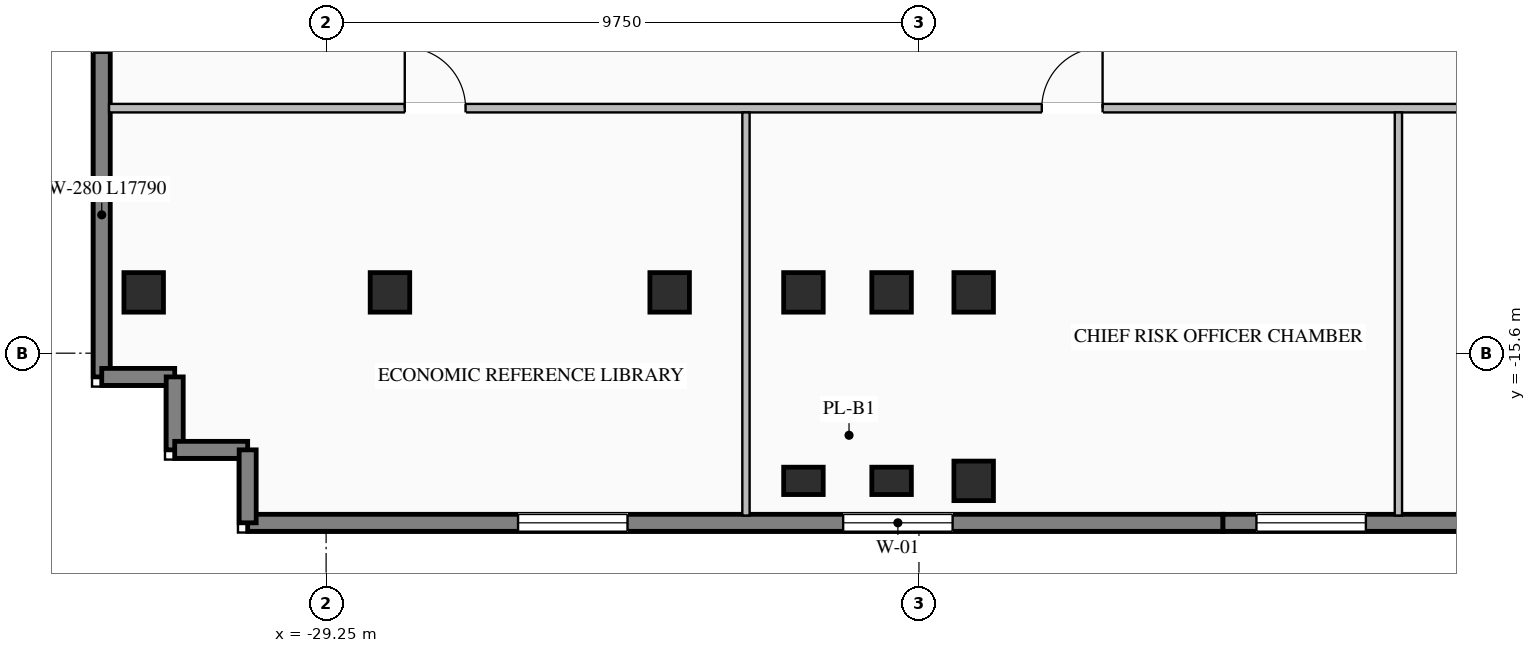
"""IFC4 building model, lengths in metres.
Left out: names, types, materials, properties, quantities, classifications, styles, units other than length and angle.
Written with IfcOpenShell. Run it as: python <this file> out.ifc"""

import sys

from ifc_helpers import new_model, si_unit, direction, frame, frame_2d, origin, origin_2d, place, context, subcontext, project, spatial, rectangle, i_section, extrude, element, fill, save


model = new_model("IFC4")
c1 = context("Model", 3, precision=1e-05, world=origin(), true_north=direction((0.0, 1.0)))
c2 = subcontext(c1, "Body", "Model", "MODEL_VIEW")
j1 = project(units=[si_unit("LENGTHUNIT", "METRE"), si_unit("PLANEANGLEUNIT", "RADIAN")], contexts=[c1])
p1 = place(None, origin())
s1 = spatial("IfcSite", under=j1, at=p1, CompositionType="ELEMENT")
p2 = place(p1, origin())
s2 = spatial("IfcBuilding", under=s1, at=p2, CompositionType="ELEMENT")
p3 = place(p2, frame((0.0, 0.0, 148.45)))
s3 = spatial("IfcBuildingStorey", under=s2, at=p3, CompositionType="ELEMENT", Elevation=148.45)
for number, where, z_axis, x_axis in (
    (1, (-21.4, -14.6, 0.0), (0.0, 0.0, 1.0), (1.0, 0.0, 0.0)),
    (2, (-19.95, -14.6, 0.0), (0.0, 0.0, 1.0), (1.0, 0.0, 0.0)),
    (3, (-18.6, -14.6, 0.0), (0.0, 0.0, 1.0), (1.0, 0.0, 0.0)),
    (4, (-23.6, -14.6, 0.0), (0.0, 0.0, 1.0), (1.0, 0.0, 0.0)),
    (5, (-28.2, -14.6, 0.0), (0.0, 0.0, 1.0), (1.0, 0.0, 0.0)),
    (6, (-18.6, -17.7, 0.0), (0.0, 0.0, 1.0), (1.0, 0.0, 0.0)),
    (7, (-32.25, -14.6, 0.0), (0.0, 0.0, 1.0), (1.0, 0.0, 0.0)),
):
    element("IfcColumn", number, at=place(p3, frame(where, z_axis=z_axis, x_axis=x_axis)), inside=s3, PredefinedType="COLUMN", context=c2, shape_type="SweptSolid", body=[
        extrude(i_section(OverallWidth=0.65, OverallDepth=0.65, WebThickness=0.028, FlangeThickness=0.04, at=origin_2d()), origin(), (0.0, 0.0, 1.0), 3.45),
    ])
for number, where, z_axis, x_axis in (
    (8, (-21.4, -17.7, 0.0), (0.0, 0.0, 1.0), (1.0, 0.0, 0.0)),
    (9, (-19.95, -17.7, 0.0), (0.0, 0.0, 1.0), (1.0, 0.0, 0.0)),
):
    element("IfcColumn", number, at=place(p3, frame(where, z_axis=z_axis, x_axis=x_axis)), inside=s3, PredefinedType="PILASTER", context=c2, shape_type="SweptSolid", body=[
        extrude(rectangle(XDim=0.65, YDim=0.45, at=origin_2d()), origin(), (0.0, 0.0, 1.0), 3.45),
    ])
p4 = place(p3, frame((-14.5, -18.39, 0.0), z_axis=(0.0, 0.0, 1.0), x_axis=(-1.0, 0.0, 0.0)))
e10 = element("IfcWall", 10, at=p4, inside=s3, PredefinedType="STANDARD", context=c2, shape_type="SweptSolid", body=[
    extrude(rectangle(XDim=16.04, YDim=0.28, at=frame_2d((8.02, 0.0))), origin(), (0.0, 0.0, 1.0), 3.25),
])
p5 = place(p4, frame((4.447, 0.0, 0.76)))
e11 = element("IfcOpeningElement", 11, at=p5, cuts=e10, PredefinedType="OPENING", context=c2, shape_type="SweptSolid", body=[
    extrude(rectangle(XDim=1.8, YDim=1.95, at=frame_2d((0.9, 0.975))), frame((0.0, 0.15, 0.0), z_axis=(0.0, -1.0, 0.0), x_axis=(1.0, 0.0, 0.0)), (0.0, 0.0, 1.0), 0.3),
])
p6 = place(p4, frame((9.793, 0.0, 0.76)))
e12 = element("IfcOpeningElement", 12, at=p6, cuts=e10, PredefinedType="OPENING", context=c2, shape_type="SweptSolid", body=[
    extrude(rectangle(XDim=1.8, YDim=1.95, at=frame_2d((0.9, 0.975))), frame((0.0, 0.15, 0.0), z_axis=(0.0, -1.0, 0.0), x_axis=(1.0, 0.0, 0.0)), (0.0, 0.0, 1.0), 0.3),
])
p7 = place(p3, frame((-5.5, -18.39, 0.0), z_axis=(0.0, 0.0, 1.0), x_axis=(-1.0, 0.0, 0.0)))
e13 = element("IfcWall", 13, at=p7, inside=s3, PredefinedType="STANDARD", context=c2, shape_type="SweptSolid", body=[
    extrude(rectangle(XDim=9.0, YDim=0.28, at=frame_2d((4.5, 0.0))), origin(), (0.0, 0.0, 1.0), 3.25),
])
p8 = place(p7, frame((2.1, 0.0, 0.76)))
e14 = element("IfcOpeningElement", 14, at=p8, cuts=e13, PredefinedType="OPENING", context=c2, shape_type="SweptSolid", body=[
    extrude(rectangle(XDim=1.8, YDim=1.95, at=frame_2d((0.9, 0.975))), frame((0.0, 0.15, 0.0), z_axis=(0.0, -1.0, 0.0), x_axis=(1.0, 0.0, 0.0)), (0.0, 0.0, 1.0), 0.3),
])
p9 = place(p7, frame((6.65, 0.0, 0.76)))
e15 = element("IfcOpeningElement", 15, at=p9, cuts=e13, PredefinedType="OPENING", context=c2, shape_type="SweptSolid", body=[
    extrude(rectangle(XDim=1.8, YDim=1.95, at=frame_2d((0.9, 0.975))), frame((0.0, 0.15, 0.0), z_axis=(0.0, -1.0, 0.0), x_axis=(1.0, 0.0, 0.0)), (0.0, 0.0, 1.0), 0.3),
])
p10 = place(p3, frame((-32.94, -15.99, 0.0), z_axis=(0.0, 0.0, 1.0), x_axis=(0.0, 1.0, 0.0)))
e16 = element("IfcWall", 16, at=p10, inside=s3, PredefinedType="STANDARD", context=c2, shape_type="SweptSolid", body=[
    extrude(rectangle(XDim=17.79, YDim=0.28, at=frame_2d((8.895, 0.0))), origin(), (0.0, 0.0, 1.0), 3.25),
])
p11 = place(p10, frame((5.33, 0.0, 0.76)))
e17 = element("IfcOpeningElement", 17, at=p11, cuts=e16, PredefinedType="OPENING", context=c2, shape_type="SweptSolid", body=[
    extrude(rectangle(XDim=1.2, YDim=1.95, at=frame_2d((0.6, 0.975))), frame((0.0, 0.15, 0.0), z_axis=(0.0, -1.0, 0.0), x_axis=(1.0, 0.0, 0.0)), (0.0, 0.0, 1.0), 0.3),
])
p12 = place(p10, frame((11.26, 0.0, 0.76)))
e18 = element("IfcOpeningElement", 18, at=p12, cuts=e16, PredefinedType="OPENING", context=c2, shape_type="SweptSolid", body=[
    extrude(rectangle(XDim=1.2, YDim=1.95, at=frame_2d((0.6, 0.975))), frame((0.0, 0.15, 0.0), z_axis=(0.0, -1.0, 0.0), x_axis=(1.0, 0.0, 0.0)), (0.0, 0.0, 1.0), 0.3),
])
for number, where, z_axis, x_axis in (
    (19, (-32.94, -15.99, 0.0), (0.0, 0.0, 1.0), (1.0, 0.0, 0.0)),
    (20, (-31.74, -15.99, 0.0), (0.0, 0.0, 1.0), (0.0, -1.0, 0.0)),
    (21, (-31.74, -17.19, 0.0), (0.0, 0.0, 1.0), (1.0, 0.0, 0.0)),
    (22, (-30.54, -17.19, 0.0), (0.0, 0.0, 1.0), (0.0, -1.0, 0.0)),
):
    element("IfcWall", number, at=place(p3, frame(where, z_axis=z_axis, x_axis=x_axis)), inside=s3, PredefinedType="STANDARD", context=c2, shape_type="SweptSolid", body=[
        extrude(rectangle(XDim=1.2, YDim=0.28, at=frame_2d((0.6, 0.0))), origin(), (0.0, 0.0, 1.0), 3.25),
    ])
p13 = place(p3, frame((-32.82, -11.57, 0.0), z_axis=(0.0, 0.0, 1.0), x_axis=(1.0, 0.0, 0.0)))
e23 = element("IfcWall", 23, at=p13, inside=s3, PredefinedType="STANDARD", context=c2, shape_type="SweptSolid", body=[
    extrude(rectangle(XDim=63.64, YDim=0.14, at=frame_2d((31.82, 0.0))), origin(), (0.0, 0.0, 1.0), 3.25),
])
p14 = place(p13, frame((32.91, 0.0, 0.0)))
e24 = element("IfcOpeningElement", 24, at=p14, cuts=e23, PredefinedType="OPENING", context=c2, shape_type="SweptSolid", body=[
    extrude(rectangle(XDim=0.92, YDim=2.08, at=frame_2d((0.46, 1.04))), frame((0.0, 0.08, 0.0), z_axis=(0.0, -1.0, 0.0), x_axis=(1.0, 0.0, 0.0)), (0.0, 0.0, 1.0), 0.16),
])
p15 = place(p13, frame((36.41, 0.0, 0.0)))
e25 = element("IfcOpeningElement", 25, at=p15, cuts=e23, PredefinedType="OPENING", context=c2, shape_type="SweptSolid", body=[
    extrude(rectangle(XDim=0.92, YDim=2.08, at=frame_2d((0.46, 1.04))), frame((0.0, 0.08, 0.0), z_axis=(0.0, -1.0, 0.0), x_axis=(1.0, 0.0, 0.0)), (0.0, 0.0, 1.0), 0.16),
])
p16 = place(p13, frame((39.26, 0.0, 0.0)))
e26 = element("IfcOpeningElement", 26, at=p16, cuts=e23, PredefinedType="OPENING", context=c2, shape_type="SweptSolid", body=[
    extrude(rectangle(XDim=0.92, YDim=2.08, at=frame_2d((0.46, 1.04))), frame((0.0, 0.08, 0.0), z_axis=(0.0, -1.0, 0.0), x_axis=(1.0, 0.0, 0.0)), (0.0, 0.0, 1.0), 0.16),
])
p17 = place(p13, frame((4.864, 0.0, 0.0)))
e27 = element("IfcOpeningElement", 27, at=p17, cuts=e23, PredefinedType="OPENING", context=c2, shape_type="SweptSolid", body=[
    extrude(rectangle(XDim=1.0, YDim=2.08, at=frame_2d((0.5, 1.04))), frame((0.0, 0.08, 0.0), z_axis=(0.0, -1.0, 0.0), x_axis=(1.0, 0.0, 0.0)), (0.0, 0.0, 1.0), 0.16),
])
p18 = place(p13, frame((15.34, 0.0, 0.0)))
e28 = element("IfcOpeningElement", 28, at=p18, cuts=e23, PredefinedType="OPENING", context=c2, shape_type="SweptSolid", body=[
    extrude(rectangle(XDim=1.0, YDim=2.08, at=frame_2d((0.5, 1.04))), frame((0.0, 0.08, 0.0), z_axis=(0.0, -1.0, 0.0), x_axis=(1.0, 0.0, 0.0)), (0.0, 0.0, 1.0), 0.16),
])
p19 = place(p13, frame((25.913, 0.0, 0.0)))
e29 = element("IfcOpeningElement", 29, at=p19, cuts=e23, PredefinedType="OPENING", context=c2, shape_type="SweptSolid", body=[
    extrude(rectangle(XDim=1.0, YDim=2.08, at=frame_2d((0.5, 1.04))), frame((0.0, 0.08, 0.0), z_axis=(0.0, -1.0, 0.0), x_axis=(1.0, 0.0, 0.0)), (0.0, 0.0, 1.0), 0.16),
])
p20 = place(p13, frame((44.075, 0.0, 0.0)))
e30 = element("IfcOpeningElement", 30, at=p20, cuts=e23, PredefinedType="OPENING", context=c2, shape_type="SweptSolid", body=[
    extrude(rectangle(XDim=1.0, YDim=2.08, at=frame_2d((0.5, 1.04))), frame((0.0, 0.08, 0.0), z_axis=(0.0, -1.0, 0.0), x_axis=(1.0, 0.0, 0.0)), (0.0, 0.0, 1.0), 0.16),
])
p21 = place(p13, frame((51.7, 0.0, 0.0)))
e31 = element("IfcOpeningElement", 31, at=p21, cuts=e23, PredefinedType="OPENING", context=c2, shape_type="SweptSolid", body=[
    extrude(rectangle(XDim=1.0, YDim=2.08, at=frame_2d((0.5, 1.04))), frame((0.0, 0.08, 0.0), z_axis=(0.0, -1.0, 0.0), x_axis=(1.0, 0.0, 0.0)), (0.0, 0.0, 1.0), 0.16),
])
p22 = place(p13, frame((59.229, 0.0, 0.0)))
e32 = element("IfcOpeningElement", 32, at=p22, cuts=e23, PredefinedType="OPENING", context=c2, shape_type="SweptSolid", body=[
    extrude(rectangle(XDim=1.0, YDim=2.08, at=frame_2d((0.5, 1.04))), frame((0.0, 0.08, 0.0), z_axis=(0.0, -1.0, 0.0), x_axis=(1.0, 0.0, 0.0)), (0.0, 0.0, 1.0), 0.16),
])
for number, where, z_axis, x_axis in (
    (33, (-22.345, -18.27, 0.0), (0.0, 0.0, 1.0), (0.0, 1.0, 0.0)),
    (34, (-11.615, -18.27, 0.0), (0.0, 0.0, 1.0), (0.0, 1.0, 0.0)),
):
    element("IfcWall", number, at=place(p3, frame(where, z_axis=z_axis, x_axis=x_axis)), inside=s3, PredefinedType="STANDARD", context=c2, shape_type="SweptSolid", body=[
        extrude(rectangle(XDim=6.63, YDim=0.12, at=frame_2d((3.315, 0.0))), origin(), (0.0, 0.0, 1.0), 3.25),
    ])
p23 = place(p5, origin())
e35 = element("IfcWindow", 35, at=p23, inside=s3, PartitioningType="SINGLE_PANEL", PredefinedType="WINDOW", context=c2, shape_type="SweptSolid", body=[
    extrude(rectangle(XDim=1.8, YDim=1.95, at=frame_2d((0.9, 0.975))), frame((0.0, 0.03, 0.0), z_axis=(0.0, -1.0, 0.0), x_axis=(1.0, 0.0, 0.0)), (0.0, 0.0, 1.0), 0.06),
])
fill(e11, e35)
p24 = place(p6, origin())
e36 = element("IfcWindow", 36, at=p24, inside=s3, PartitioningType="SINGLE_PANEL", PredefinedType="WINDOW", context=c2, shape_type="SweptSolid", body=[
    extrude(rectangle(XDim=1.8, YDim=1.95, at=frame_2d((0.9, 0.975))), frame((0.0, 0.03, 0.0), z_axis=(0.0, -1.0, 0.0), x_axis=(1.0, 0.0, 0.0)), (0.0, 0.0, 1.0), 0.06),
])
fill(e12, e36)
p25 = place(p9, origin())
e37 = element("IfcWindow", 37, at=p25, inside=s3, PartitioningType="SINGLE_PANEL", PredefinedType="WINDOW", context=c2, shape_type="SweptSolid", body=[
    extrude(rectangle(XDim=1.8, YDim=1.95, at=frame_2d((0.9, 0.975))), frame((0.0, 0.03, 0.0), z_axis=(0.0, -1.0, 0.0), x_axis=(1.0, 0.0, 0.0)), (0.0, 0.0, 1.0), 0.06),
])
fill(e15, e37)
p26 = place(p11, origin())
e38 = element("IfcWindow", 38, at=p26, inside=s3, PartitioningType="SINGLE_PANEL", PredefinedType="WINDOW", context=c2, shape_type="SweptSolid", body=[
    extrude(rectangle(XDim=1.2, YDim=1.95, at=frame_2d((0.6, 0.975))), frame((0.0, 0.03, 0.0), z_axis=(0.0, -1.0, 0.0), x_axis=(1.0, 0.0, 0.0)), (0.0, 0.0, 1.0), 0.06),
])
fill(e17, e38)
p27 = place(p17, origin())
e39 = element("IfcDoor", 39, at=p27, inside=s3, OperationType="SINGLE_SWING_LEFT", PredefinedType="DOOR", context=c2, shape_type="SweptSolid", body=[
    extrude(rectangle(XDim=1.0, YDim=2.08, at=frame_2d((0.5, 1.04))), frame((0.0, 0.025, 0.0), z_axis=(0.0, -1.0, 0.0), x_axis=(1.0, 0.0, 0.0)), (0.0, 0.0, 1.0), 0.05),
])
fill(e27, e39)
p28 = place(p18, origin())
e40 = element("IfcDoor", 40, at=p28, inside=s3, OperationType="SINGLE_SWING_RIGHT", PredefinedType="DOOR", context=c2, shape_type="SweptSolid", body=[
    extrude(rectangle(XDim=1.0, YDim=2.08, at=frame_2d((0.5, 1.04))), frame((0.0, 0.025, 0.0), z_axis=(0.0, -1.0, 0.0), x_axis=(1.0, 0.0, 0.0)), (0.0, 0.0, 1.0), 0.05),
])
fill(e28, e40)
save(model, sys.argv[1])
